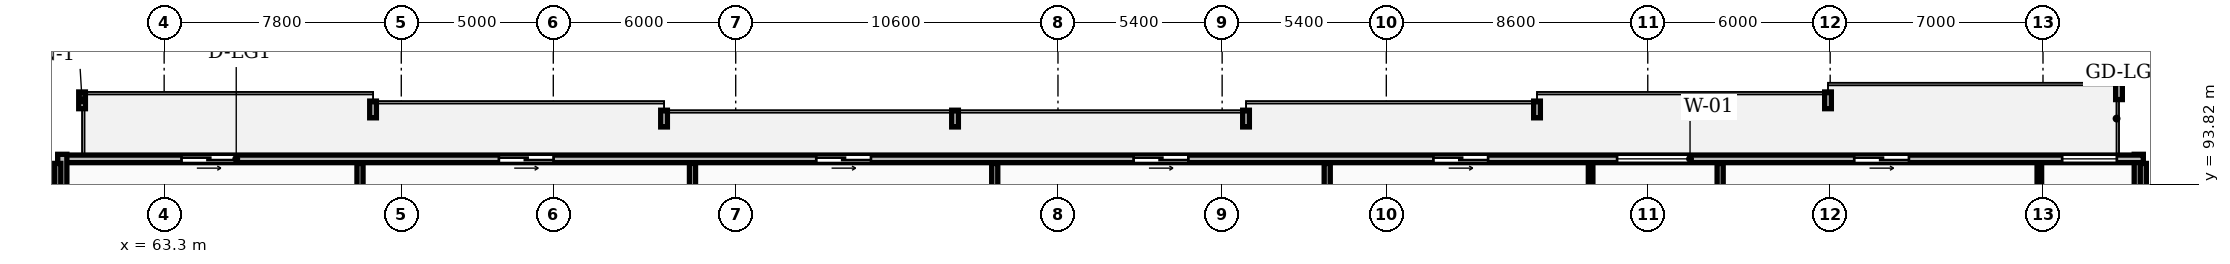
"""IFC4 building model, lengths in metres.
Left out: names, types, materials, properties, quantities, classifications, styles, units other than length and angle.
Written with IfcOpenShell. Run it as: python <this file> out.ifc"""

import sys

from ifc_helpers import new_model, si_unit, direction, frame, frame_2d, origin, place, context, subcontext, project, spatial, rectangle, extrude, element, fill, save


model = new_model("IFC4")
c1 = context("Model", 3, precision=1e-05, world=origin(), true_north=direction((0.0, 1.0)))
c2 = subcontext(c1, "Body", "Model", "MODEL_VIEW")
j1 = project(units=[si_unit("LENGTHUNIT", "METRE"), si_unit("PLANEANGLEUNIT", "RADIAN")], contexts=[c1])
p1 = place(None, origin())
s1 = spatial("IfcSite", under=j1, at=p1, CompositionType="ELEMENT")
p2 = place(p1, origin())
s2 = spatial("IfcBuilding", under=s1, at=p2, CompositionType="ELEMENT")
p3 = place(p2, frame((0.0, 0.0, 204.35)))
s3 = spatial("IfcBuildingStorey", under=s2, at=p3, CompositionType="ELEMENT", Elevation=204.35)
p4 = place(p3, frame((128.25, 91.2, 0.0), z_axis=(0.0, 0.0, 1.0), x_axis=(0.0, 1.0, 0.0)))
e1 = element("IfcWall", 1, at=p4, inside=s3, PredefinedType="STANDARD", context=c2, shape_type="SweptSolid", body=[
    extrude(rectangle(XDim=3.6, YDim=0.3, at=frame_2d((1.8, 0.0))), origin(), (0.0, 0.0, 1.0), 2.98),
])
p5 = place(p3, frame((128.4, 94.65, 0.0), z_axis=(0.0, 0.0, 1.0), x_axis=(-1.0, 0.0, 0.0)))
e2 = element("IfcWall", 2, at=p5, inside=s3, PredefinedType="STANDARD", context=c2, shape_type="SweptSolid", body=[
    extrude(rectangle(XDim=68.6, YDim=0.25, at=frame_2d((34.3, 0.0))), origin(), (0.0, 0.0, 1.0), 2.98),
])
p6 = place(p5, frame((62.729, 0.0, 0.0)))
e3 = element("IfcOpeningElement", 3, at=p6, cuts=e2, PredefinedType="OPENING", context=c2, shape_type="SweptSolid", body=[
    extrude(rectangle(XDim=1.8, YDim=2.2, at=frame_2d((0.9, 1.1))), frame((0.0, 0.135, 0.0), z_axis=(0.0, -1.0, 0.0), x_axis=(1.0, 0.0, 0.0)), (0.0, 0.0, 1.0), 0.27),
])
p7 = place(p5, frame((52.29, 0.0, 0.0)))
e4 = element("IfcOpeningElement", 4, at=p7, cuts=e2, PredefinedType="OPENING", context=c2, shape_type="SweptSolid", body=[
    extrude(rectangle(XDim=1.8, YDim=2.2, at=frame_2d((0.9, 1.1))), frame((0.0, 0.135, 0.0), z_axis=(0.0, -1.0, 0.0), x_axis=(1.0, 0.0, 0.0)), (0.0, 0.0, 1.0), 0.27),
])
p8 = place(p5, frame((41.851, 0.0, 0.0)))
e5 = element("IfcOpeningElement", 5, at=p8, cuts=e2, PredefinedType="OPENING", context=c2, shape_type="SweptSolid", body=[
    extrude(rectangle(XDim=1.8, YDim=2.2, at=frame_2d((0.9, 1.1))), frame((0.0, 0.135, 0.0), z_axis=(0.0, -1.0, 0.0), x_axis=(1.0, 0.0, 0.0)), (0.0, 0.0, 1.0), 0.27),
])
p9 = place(p5, frame((31.412, 0.0, 0.0)))
e6 = element("IfcOpeningElement", 6, at=p9, cuts=e2, PredefinedType="OPENING", context=c2, shape_type="SweptSolid", body=[
    extrude(rectangle(XDim=1.8, YDim=2.2, at=frame_2d((0.9, 1.1))), frame((0.0, 0.135, 0.0), z_axis=(0.0, -1.0, 0.0), x_axis=(1.0, 0.0, 0.0)), (0.0, 0.0, 1.0), 0.27),
])
p10 = place(p5, frame((21.552, 0.0, 0.0)))
e7 = element("IfcOpeningElement", 7, at=p10, cuts=e2, PredefinedType="OPENING", context=c2, shape_type="SweptSolid", body=[
    extrude(rectangle(XDim=1.8, YDim=2.2, at=frame_2d((0.9, 1.1))), frame((0.0, 0.135, 0.0), z_axis=(0.0, -1.0, 0.0), x_axis=(1.0, 0.0, 0.0)), (0.0, 0.0, 1.0), 0.27),
])
p11 = place(p5, frame((14.909, 0.0, 0.85)))
e8 = element("IfcOpeningElement", 8, at=p11, cuts=e2, PredefinedType="OPENING", context=c2, shape_type="SweptSolid", body=[
    extrude(rectangle(XDim=2.4, YDim=1.9, at=frame_2d((1.2, 0.95))), frame((0.0, 0.135, 0.0), z_axis=(0.0, -1.0, 0.0), x_axis=(1.0, 0.0, 0.0)), (0.0, 0.0, 1.0), 0.27),
])
p12 = place(p5, frame((7.709, 0.0, 0.0)))
e9 = element("IfcOpeningElement", 9, at=p12, cuts=e2, PredefinedType="OPENING", context=c2, shape_type="SweptSolid", body=[
    extrude(rectangle(XDim=1.8, YDim=2.2, at=frame_2d((0.9, 1.1))), frame((0.0, 0.135, 0.0), z_axis=(0.0, -1.0, 0.0), x_axis=(1.0, 0.0, 0.0)), (0.0, 0.0, 1.0), 0.27),
])
p13 = place(p5, frame((0.87, 0.0, 0.85)))
e10 = element("IfcOpeningElement", 10, at=p13, cuts=e2, PredefinedType="OPENING", context=c2, shape_type="SweptSolid", body=[
    extrude(rectangle(XDim=1.8, YDim=1.8, at=frame_2d((0.9, 0.9))), frame((0.0, 0.135, 0.0), z_axis=(0.0, -1.0, 0.0), x_axis=(1.0, 0.0, 0.0)), (0.0, 0.0, 1.0), 0.27),
])
p14 = place(p3, frame((59.95, 94.8, 0.0), z_axis=(0.0, 0.0, 1.0), x_axis=(0.0, -1.0, 0.0)))
e11 = element("IfcWall", 11, at=p14, inside=s3, PredefinedType="STANDARD", context=c2, shape_type="SweptSolid", body=[
    extrude(rectangle(XDim=3.6, YDim=0.3, at=frame_2d((1.8, 0.0))), origin(), (0.0, 0.0, 1.0), 2.98),
])
for number, where, z_axis, x_axis in (
    (12, (59.8, 70.18, 0.0), (0.0, 0.0, 1.0), (0.0, 1.0, 0.0)),
    (13, (128.4, 70.18, 0.0), (0.0, 0.0, 1.0), (0.0, 1.0, 0.0)),
):
    element("IfcWall", number, at=place(p3, frame(where, z_axis=z_axis, x_axis=x_axis)), inside=s3, PredefinedType="PARTITIONING", context=c2, shape_type="SweptSolid", body=[
        extrude(rectangle(XDim=24.32, YDim=0.2, at=frame_2d((12.16, 0.0))), origin(), (0.0, 0.0, 1.0), 2.287),
    ])
for number, where, z_axis, x_axis in (
    (14, (69.742, 70.18, 0.0), (0.0, 0.0, 1.0), (0.0, 1.0, 0.0)),
    (15, (80.678, 70.18, 0.0), (0.0, 0.0, 1.0), (0.0, 1.0, 0.0)),
    (16, (90.62, 70.18, 0.0), (0.0, 0.0, 1.0), (0.0, 1.0, 0.0)),
    (17, (101.556, 70.18, 0.0), (0.0, 0.0, 1.0), (0.0, 1.0, 0.0)),
    (18, (114.481, 70.18, 0.0), (0.0, 0.0, 1.0), (0.0, 1.0, 0.0)),
):
    element("IfcWall", number, at=place(p3, frame(where, z_axis=z_axis, x_axis=x_axis)), inside=s3, PredefinedType="PARTITIONING", context=c2, shape_type="SweptSolid", body=[
        extrude(rectangle(XDim=24.32, YDim=0.2, at=frame_2d((12.16, 0.0))), origin(), (0.0, 0.0, 1.0), 2.98),
    ])
p15 = place(p3, frame((110.22, 84.54, 0.0), z_axis=(0.0, 0.0, 1.0), x_axis=(0.0, 1.0, 0.0)))
e19 = element("IfcWall", 19, at=p15, inside=s3, PredefinedType="PARTITIONING", context=c2, shape_type="SweptSolid", body=[
    extrude(rectangle(XDim=9.96, YDim=0.15, at=frame_2d((4.98, 0.0))), origin(), (0.0, 0.0, 1.0), 2.98),
])
p16 = place(p15, frame((1.43, 0.0, 0.0)))
e20 = element("IfcOpeningElement", 20, at=p16, cuts=e19, PredefinedType="OPENING", context=c2, shape_type="SweptSolid", body=[
    extrude(rectangle(XDim=0.84, YDim=2.04, at=frame_2d((0.42, 1.02))), frame((0.0, 0.085, 0.0), z_axis=(0.0, -1.0, 0.0), x_axis=(1.0, 0.0, 0.0)), (0.0, 0.0, 1.0), 0.17),
])
p17 = place(p15, frame((3.92, 0.0, 0.0)))
e21 = element("IfcOpeningElement", 21, at=p17, cuts=e19, PredefinedType="OPENING", context=c2, shape_type="SweptSolid", body=[
    extrude(rectangle(XDim=0.84, YDim=2.04, at=frame_2d((0.42, 1.02))), frame((0.0, 0.085, 0.0), z_axis=(0.0, -1.0, 0.0), x_axis=(1.0, 0.0, 0.0)), (0.0, 0.0, 1.0), 0.17),
])
p18 = place(p15, frame((8.297, 0.0, 0.0)))
e22 = element("IfcOpeningElement", 22, at=p18, cuts=e19, PredefinedType="OPENING", context=c2, shape_type="SweptSolid", body=[
    extrude(rectangle(XDim=0.88, YDim=2.06, at=frame_2d((0.44, 1.03))), frame((0.0, 0.085, 0.0), z_axis=(0.0, -1.0, 0.0), x_axis=(1.0, 0.0, 0.0)), (0.0, 0.0, 1.0), 0.17),
])
p19 = place(p3, frame((124.98, 84.54, 0.0), z_axis=(0.0, 0.0, 1.0), x_axis=(0.0, 1.0, 0.0)))
e23 = element("IfcWall", 23, at=p19, inside=s3, PredefinedType="PARTITIONING", context=c2, shape_type="SweptSolid", body=[
    extrude(rectangle(XDim=9.96, YDim=0.15, at=frame_2d((4.98, 0.0))), origin(), (0.0, 0.0, 1.0), 2.98),
])
p20 = place(p19, frame((1.43, 0.0, 0.0)))
e24 = element("IfcOpeningElement", 24, at=p20, cuts=e23, PredefinedType="OPENING", context=c2, shape_type="SweptSolid", body=[
    extrude(rectangle(XDim=0.84, YDim=2.04, at=frame_2d((0.42, 1.02))), frame((0.0, 0.085, 0.0), z_axis=(0.0, -1.0, 0.0), x_axis=(1.0, 0.0, 0.0)), (0.0, 0.0, 1.0), 0.17),
])
p21 = place(p19, frame((3.92, 0.0, 0.0)))
e25 = element("IfcOpeningElement", 25, at=p21, cuts=e23, PredefinedType="OPENING", context=c2, shape_type="SweptSolid", body=[
    extrude(rectangle(XDim=0.84, YDim=2.04, at=frame_2d((0.42, 1.02))), frame((0.0, 0.085, 0.0), z_axis=(0.0, -1.0, 0.0), x_axis=(1.0, 0.0, 0.0)), (0.0, 0.0, 1.0), 0.17),
])
p22 = place(p19, frame((5.48, 0.0, 0.0)))
e26 = element("IfcOpeningElement", 26, at=p22, cuts=e23, PredefinedType="OPENING", context=c2, shape_type="SweptSolid", body=[
    extrude(rectangle(XDim=0.88, YDim=2.06, at=frame_2d((0.44, 1.03))), frame((0.0, 0.085, 0.0), z_axis=(0.0, -1.0, 0.0), x_axis=(1.0, 0.0, 0.0)), (0.0, 0.0, 1.0), 0.17),
])
p23 = place(p6, origin())
e27 = element("IfcDoor", 27, at=p23, inside=s3, OperationType="SLIDING_TO_LEFT", PredefinedType="DOOR", context=c2, shape_type="SweptSolid", body=[
    extrude(rectangle(XDim=1.8, YDim=2.2, at=frame_2d((0.9, 1.1))), frame((0.0, 0.025, 0.0), z_axis=(0.0, -1.0, 0.0), x_axis=(1.0, 0.0, 0.0)), (0.0, 0.0, 1.0), 0.05),
])
fill(e3, e27)
p24 = place(p7, origin())
e28 = element("IfcDoor", 28, at=p24, inside=s3, OperationType="SLIDING_TO_LEFT", PredefinedType="DOOR", context=c2, shape_type="SweptSolid", body=[
    extrude(rectangle(XDim=1.8, YDim=2.2, at=frame_2d((0.9, 1.1))), frame((0.0, 0.025, 0.0), z_axis=(0.0, -1.0, 0.0), x_axis=(1.0, 0.0, 0.0)), (0.0, 0.0, 1.0), 0.05),
])
fill(e4, e28)
p25 = place(p8, origin())
e29 = element("IfcDoor", 29, at=p25, inside=s3, OperationType="SLIDING_TO_LEFT", PredefinedType="DOOR", context=c2, shape_type="SweptSolid", body=[
    extrude(rectangle(XDim=1.8, YDim=2.2, at=frame_2d((0.9, 1.1))), frame((0.0, 0.025, 0.0), z_axis=(0.0, -1.0, 0.0), x_axis=(1.0, 0.0, 0.0)), (0.0, 0.0, 1.0), 0.05),
])
fill(e5, e29)
p26 = place(p9, origin())
e30 = element("IfcDoor", 30, at=p26, inside=s3, OperationType="SLIDING_TO_LEFT", PredefinedType="DOOR", context=c2, shape_type="SweptSolid", body=[
    extrude(rectangle(XDim=1.8, YDim=2.2, at=frame_2d((0.9, 1.1))), frame((0.0, 0.025, 0.0), z_axis=(0.0, -1.0, 0.0), x_axis=(1.0, 0.0, 0.0)), (0.0, 0.0, 1.0), 0.05),
])
fill(e6, e30)
p27 = place(p10, origin())
e31 = element("IfcDoor", 31, at=p27, inside=s3, OperationType="SLIDING_TO_LEFT", PredefinedType="DOOR", context=c2, shape_type="SweptSolid", body=[
    extrude(rectangle(XDim=1.8, YDim=2.2, at=frame_2d((0.9, 1.1))), frame((0.0, 0.025, 0.0), z_axis=(0.0, -1.0, 0.0), x_axis=(1.0, 0.0, 0.0)), (0.0, 0.0, 1.0), 0.05),
])
fill(e7, e31)
p28 = place(p11, origin())
e32 = element("IfcWindow", 32, at=p28, inside=s3, PartitioningType="DOUBLE_PANEL_VERTICAL", PredefinedType="WINDOW", context=c2, shape_type="SweptSolid", body=[
    extrude(rectangle(XDim=2.4, YDim=1.9, at=frame_2d((1.2, 0.95))), frame((0.0, 0.03, 0.0), z_axis=(0.0, -1.0, 0.0), x_axis=(1.0, 0.0, 0.0)), (0.0, 0.0, 1.0), 0.06),
])
fill(e8, e32)
p29 = place(p12, origin())
e33 = element("IfcDoor", 33, at=p29, inside=s3, OperationType="SLIDING_TO_LEFT", PredefinedType="DOOR", context=c2, shape_type="SweptSolid", body=[
    extrude(rectangle(XDim=1.8, YDim=2.2, at=frame_2d((0.9, 1.1))), frame((0.0, 0.025, 0.0), z_axis=(0.0, -1.0, 0.0), x_axis=(1.0, 0.0, 0.0)), (0.0, 0.0, 1.0), 0.05),
])
fill(e9, e33)
p30 = place(p13, origin())
e34 = element("IfcWindow", 34, at=p30, inside=s3, PartitioningType="SINGLE_PANEL", PredefinedType="WINDOW", context=c2, shape_type="SweptSolid", body=[
    extrude(rectangle(XDim=1.8, YDim=1.8, at=frame_2d((0.9, 0.9))), frame((0.0, 0.03, 0.0), z_axis=(0.0, -1.0, 0.0), x_axis=(1.0, 0.0, 0.0)), (0.0, 0.0, 1.0), 0.06),
])
fill(e10, e34)
save(model, sys.argv[1])
